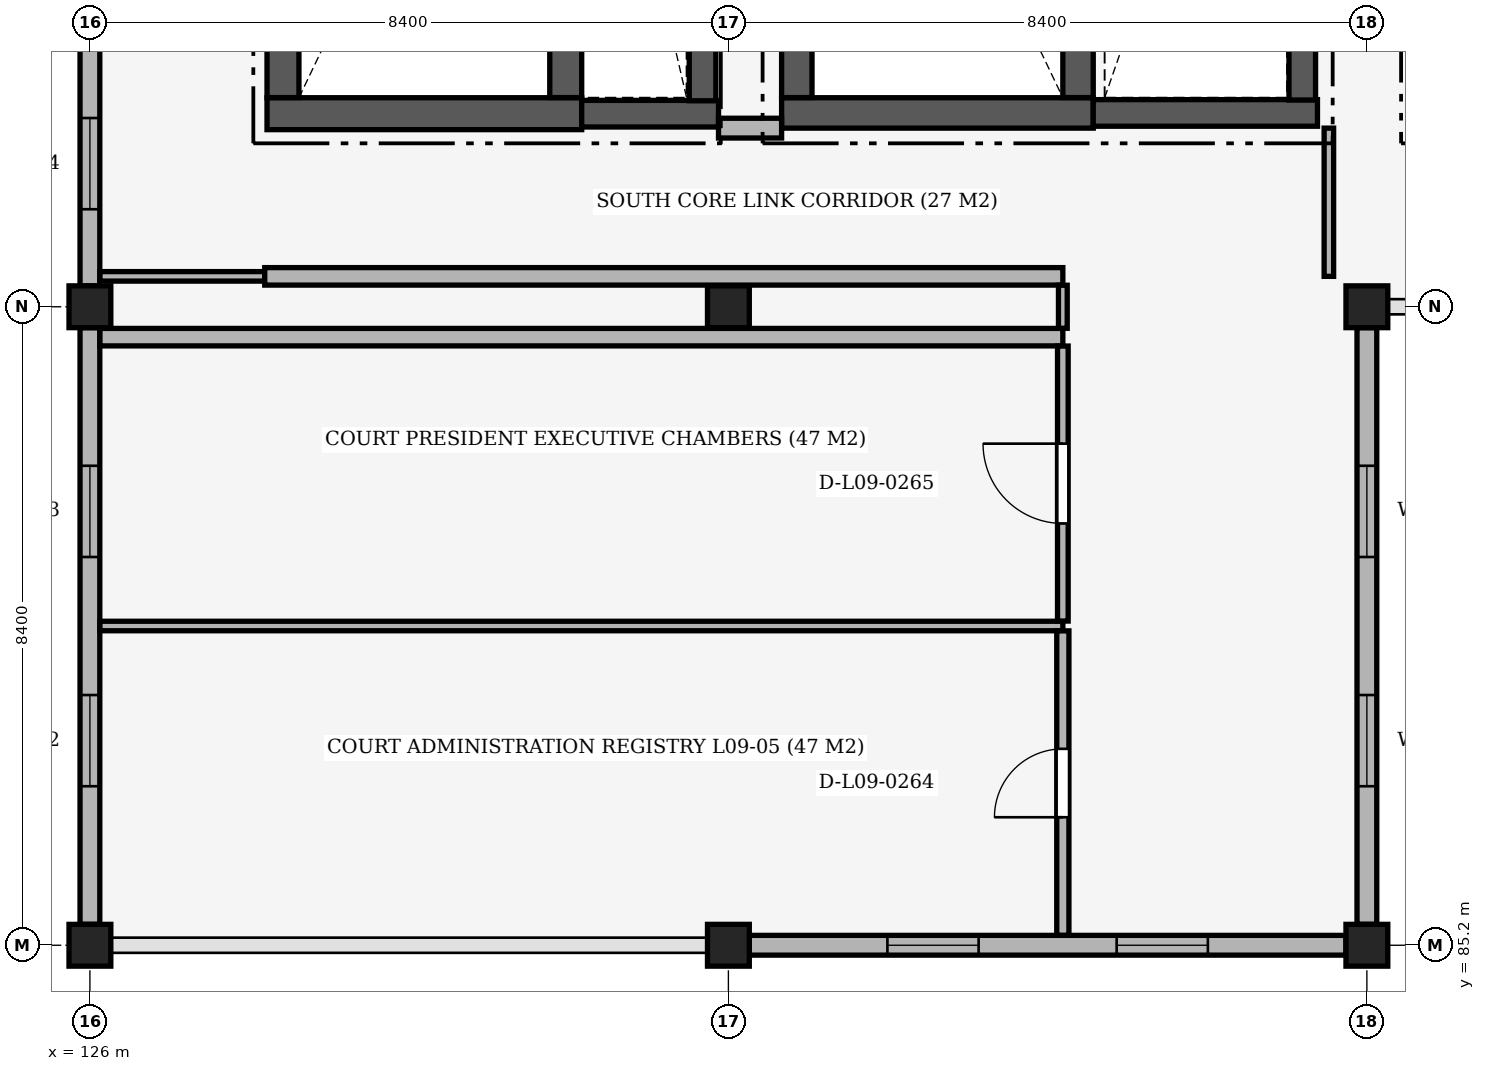
"""IFC4 building model, lengths in metres.
Left out: names, types, materials, properties, quantities, classifications, styles, units other than length and angle.
Written with IfcOpenShell. Run it as: python <this file> out.ifc"""

import sys

from ifc_helpers import new_model, si_unit, direction, frame, frame_2d, origin, origin_2d, place, context, subcontext, project, spatial, rectangle, extrude, element, fill, save


model = new_model("IFC4")
c1 = context("Model", 3, precision=1e-05, world=origin(), true_north=direction((0.0, 1.0)))
c2 = subcontext(c1, "Body", "Model", "MODEL_VIEW")
j1 = project(units=[si_unit("LENGTHUNIT", "METRE"), si_unit("PLANEANGLEUNIT", "RADIAN")], contexts=[c1])
p1 = place(None, origin())
s1 = spatial("IfcSite", under=j1, at=p1, CompositionType="ELEMENT")
p2 = place(p1, origin())
s2 = spatial("IfcBuilding", under=s1, at=p2, CompositionType="ELEMENT")
p3 = place(p2, frame((0.0, 0.0, 42.0)))
s3 = spatial("IfcBuildingStorey", under=s2, at=p3, CompositionType="ELEMENT", Elevation=42.0)
for number, where, z_axis, x_axis in (
    (1, (126.0, 85.2, 0.0), (0.0, 0.0, 1.0), (1.0, 0.0, 0.0)),
    (2, (126.0, 93.6, 0.0), (0.0, 0.0, 1.0), (1.0, 0.0, 0.0)),
    (3, (134.4, 85.2, 0.0), (0.0, 0.0, 1.0), (1.0, 0.0, 0.0)),
    (4, (134.4, 93.6, 0.0), (0.0, 0.0, 1.0), (1.0, 0.0, 0.0)),
    (5, (142.8, 85.2, 0.0), (0.0, 0.0, 1.0), (1.0, 0.0, 0.0)),
    (6, (142.8, 93.6, 0.0), (0.0, 0.0, 1.0), (1.0, 0.0, 0.0)),
):
    element("IfcColumn", number, at=place(p3, frame(where, z_axis=z_axis, x_axis=x_axis)), inside=s3, PredefinedType="COLUMN", context=c2, shape_type="SweptSolid", body=[
        extrude(rectangle(XDim=0.55, YDim=0.55, at=origin_2d()), origin(), (0.0, 0.0, 1.0), 3.9),
    ])
p4 = place(p3, frame((142.525, 85.2, 0.0), z_axis=(0.0, 0.0, 1.0), x_axis=(-1.0, 0.0, 0.0)))
e7 = element("IfcWall", 7, at=p4, inside=s3, PredefinedType="SOLIDWALL", context=c2, shape_type="SweptSolid", body=[
    extrude(rectangle(XDim=7.85, YDim=0.26, at=frame_2d((3.925, 0.0))), origin(), (0.0, 0.0, 1.0), 2.96),
])
p5 = place(p4, frame((1.817, 0.0, 1.71)))
e8 = element("IfcOpeningElement", 8, at=p5, cuts=e7, PredefinedType="OPENING", context=c2, shape_type="SweptSolid", body=[
    extrude(rectangle(XDim=1.2, YDim=0.9, at=frame_2d((0.6, 0.45))), frame((0.0, 0.145, 0.0), z_axis=(0.0, -1.0, 0.0), x_axis=(1.0, 0.0, 0.0)), (0.0, 0.0, 1.0), 0.29),
])
p6 = place(p4, frame((4.833, 0.0, 1.71)))
e9 = element("IfcOpeningElement", 9, at=p6, cuts=e7, PredefinedType="OPENING", context=c2, shape_type="SweptSolid", body=[
    extrude(rectangle(XDim=1.2, YDim=0.9, at=frame_2d((0.6, 0.45))), frame((0.0, 0.145, 0.0), z_axis=(0.0, -1.0, 0.0), x_axis=(1.0, 0.0, 0.0)), (0.0, 0.0, 1.0), 0.29),
])
p7 = place(p3, frame((126.0, 85.475, 0.0), z_axis=(0.0, 0.0, 1.0), x_axis=(0.0, 1.0, 0.0)))
e10 = element("IfcWall", 10, at=p7, inside=s3, PredefinedType="SOLIDWALL", context=c2, shape_type="SweptSolid", body=[
    extrude(rectangle(XDim=7.85, YDim=0.26, at=frame_2d((3.925, 0.0))), origin(), (0.0, 0.0, 1.0), 2.96),
])
p8 = place(p7, frame((1.817, 0.0, 1.71)))
e11 = element("IfcOpeningElement", 11, at=p8, cuts=e10, PredefinedType="OPENING", context=c2, shape_type="SweptSolid", body=[
    extrude(rectangle(XDim=1.2, YDim=0.9, at=frame_2d((0.6, 0.45))), frame((0.0, 0.145, 0.0), z_axis=(0.0, -1.0, 0.0), x_axis=(1.0, 0.0, 0.0)), (0.0, 0.0, 1.0), 0.29),
])
p9 = place(p7, frame((4.833, 0.0, 1.71)))
e12 = element("IfcOpeningElement", 12, at=p9, cuts=e10, PredefinedType="OPENING", context=c2, shape_type="SweptSolid", body=[
    extrude(rectangle(XDim=1.2, YDim=0.9, at=frame_2d((0.6, 0.45))), frame((0.0, 0.145, 0.0), z_axis=(0.0, -1.0, 0.0), x_axis=(1.0, 0.0, 0.0)), (0.0, 0.0, 1.0), 0.29),
])
p10 = place(p3, frame((126.0, 93.875, 0.0), z_axis=(0.0, 0.0, 1.0), x_axis=(0.0, 1.0, 0.0)))
e13 = element("IfcWall", 13, at=p10, inside=s3, PredefinedType="SOLIDWALL", context=c2, shape_type="SweptSolid", body=[
    extrude(rectangle(XDim=5.425, YDim=0.26, at=frame_2d((2.712, 0.0))), origin(), (0.0, 0.0, 1.0), 3.11),
])
p11 = place(p10, frame((1.008, 0.0, 1.86)))
e14 = element("IfcOpeningElement", 14, at=p11, cuts=e13, PredefinedType="OPENING", context=c2, shape_type="SweptSolid", body=[
    extrude(rectangle(XDim=1.2, YDim=0.9, at=frame_2d((0.6, 0.45))), frame((0.0, 0.145, 0.0), z_axis=(0.0, -1.0, 0.0), x_axis=(1.0, 0.0, 0.0)), (0.0, 0.0, 1.0), 0.29),
])
p12 = place(p10, frame((3.217, 0.0, 1.86)))
e15 = element("IfcOpeningElement", 15, at=p12, cuts=e13, PredefinedType="OPENING", context=c2, shape_type="SweptSolid", body=[
    extrude(rectangle(XDim=1.2, YDim=0.9, at=frame_2d((0.6, 0.45))), frame((0.0, 0.145, 0.0), z_axis=(0.0, -1.0, 0.0), x_axis=(1.0, 0.0, 0.0)), (0.0, 0.0, 1.0), 0.29),
])
p13 = place(p3, frame((142.8, 93.325, 0.0), z_axis=(0.0, 0.0, 1.0), x_axis=(0.0, -1.0, 0.0)))
e16 = element("IfcWall", 16, at=p13, inside=s3, PredefinedType="SOLIDWALL", context=c2, shape_type="SweptSolid", body=[
    extrude(rectangle(XDim=7.85, YDim=0.26, at=frame_2d((3.925, 0.0))), origin(), (0.0, 0.0, 1.0), 2.96),
])
p14 = place(p13, frame((1.817, 0.0, 1.71)))
e17 = element("IfcOpeningElement", 17, at=p14, cuts=e16, PredefinedType="OPENING", context=c2, shape_type="SweptSolid", body=[
    extrude(rectangle(XDim=1.2, YDim=0.9, at=frame_2d((0.6, 0.45))), frame((0.0, 0.145, 0.0), z_axis=(0.0, -1.0, 0.0), x_axis=(1.0, 0.0, 0.0)), (0.0, 0.0, 1.0), 0.29),
])
p15 = place(p13, frame((4.833, 0.0, 1.71)))
e18 = element("IfcOpeningElement", 18, at=p15, cuts=e16, PredefinedType="OPENING", context=c2, shape_type="SweptSolid", body=[
    extrude(rectangle(XDim=1.2, YDim=0.9, at=frame_2d((0.6, 0.45))), frame((0.0, 0.145, 0.0), z_axis=(0.0, -1.0, 0.0), x_axis=(1.0, 0.0, 0.0)), (0.0, 0.0, 1.0), 0.29),
])
p16 = place(p3, frame((128.33, 96.14, 0.0), z_axis=(0.0, 0.0, 1.0), x_axis=(1.0, 0.0, 0.0)))
e19 = element("IfcWall", 19, at=p16, inside=s3, PredefinedType="SHEAR", context=c2, shape_type="SweptSolid", body=[
    extrude(rectangle(XDim=4.14, YDim=0.42, at=frame_2d((2.07, 0.0))), origin(), (0.0, 0.0, 1.0), 3.66),
])
for number, where, z_axis, x_axis in (
    (20, (128.54, 96.352, 0.0), (0.0, 0.0, 1.0), (0.0, 1.0, 0.0)),
    (21, (132.26, 96.352, 0.0), (0.0, 0.0, 1.0), (0.0, 1.0, 0.0)),
):
    element("IfcWall", number, at=place(p3, frame(where, z_axis=z_axis, x_axis=x_axis)), inside=s3, PredefinedType="SHEAR", context=c2, shape_type="SweptSolid", body=[
        extrude(rectangle(XDim=6.896, YDim=0.42, at=frame_2d((3.448, 0.0))), origin(), (0.0, 0.0, 1.0), 3.66),
    ])
p17 = place(p3, frame((132.47, 96.14, 0.0), z_axis=(0.0, 0.0, 1.0), x_axis=(1.0, 0.0, 0.0)))
e22 = element("IfcWall", 22, at=p17, inside=s3, PredefinedType="SHEAR", context=c2, shape_type="SweptSolid", body=[
    extrude(rectangle(XDim=1.8, YDim=0.35, at=frame_2d((0.9, 0.0))), origin(), (0.0, 0.0, 1.0), 3.66),
])
p18 = place(p3, frame((134.06, 96.31, 0.0), z_axis=(0.0, 0.0, 1.0), x_axis=(0.0, 1.0, 0.0)))
e23 = element("IfcWall", 23, at=p18, inside=s3, PredefinedType="SHEAR", context=c2, shape_type="SweptSolid", body=[
    extrude(rectangle(XDim=7.197, YDim=0.35, at=frame_2d((3.599, 0.0))), origin(), (0.0, 0.0, 1.0), 3.66),
])
p19 = place(p3, frame((135.1, 96.15, 0.0), z_axis=(0.0, 0.0, 1.0), x_axis=(1.0, 0.0, 0.0)))
e24 = element("IfcWall", 24, at=p19, inside=s3, PredefinedType="SHEAR", context=c2, shape_type="SweptSolid", body=[
    extrude(rectangle(XDim=4.1, YDim=0.4, at=frame_2d((2.05, 0.0))), origin(), (0.0, 0.0, 1.0), 3.66),
])
for number, where, z_axis, x_axis in (
    (25, (135.3, 96.352, 0.0), (0.0, 0.0, 1.0), (0.0, 1.0, 0.0)),
    (26, (139.0, 96.352, 0.0), (0.0, 0.0, 1.0), (0.0, 1.0, 0.0)),
):
    element("IfcWall", number, at=place(p3, frame(where, z_axis=z_axis, x_axis=x_axis)), inside=s3, PredefinedType="SHEAR", context=c2, shape_type="SweptSolid", body=[
        extrude(rectangle(XDim=6.896, YDim=0.4, at=frame_2d((3.448, 0.0))), origin(), (0.0, 0.0, 1.0), 3.66),
    ])
p20 = place(p3, frame((139.2, 96.15, 0.0), z_axis=(0.0, 0.0, 1.0), x_axis=(1.0, 0.0, 0.0)))
e27 = element("IfcWall", 27, at=p20, inside=s3, PredefinedType="SHEAR", context=c2, shape_type="SweptSolid", body=[
    extrude(rectangle(XDim=2.95, YDim=0.35, at=frame_2d((1.475, 0.0))), origin(), (0.0, 0.0, 1.0), 3.66),
])
p21 = place(p3, frame((141.95, 96.32, 0.0), z_axis=(0.0, 0.0, 1.0), x_axis=(0.0, 1.0, 0.0)))
e28 = element("IfcWall", 28, at=p21, inside=s3, PredefinedType="SHEAR", context=c2, shape_type="SweptSolid", body=[
    extrude(rectangle(XDim=7.187, YDim=0.35, at=frame_2d((3.594, 0.0))), origin(), (0.0, 0.0, 1.0), 3.66),
])
p22 = place(p3, frame((126.132, 89.4, 0.0), z_axis=(0.0, 0.0, 1.0), x_axis=(1.0, 0.0, 0.0)))
e29 = element("IfcWall", 29, at=p22, inside=s3, PredefinedType="PARTITIONING", context=c2, shape_type="SweptSolid", body=[
    extrude(rectangle(XDim=12.668, YDim=0.125, at=frame_2d((6.334, 0.0))), origin(), (0.0, 0.0, 1.0), 2.96),
])
p23 = place(p3, frame((126.132, 93.2, 0.0), z_axis=(0.0, 0.0, 1.0), x_axis=(1.0, 0.0, 0.0)))
e30 = element("IfcWall", 30, at=p23, inside=s3, PredefinedType="SOLIDWALL", context=c2, shape_type="SweptSolid", body=[
    extrude(rectangle(XDim=12.668, YDim=0.23, at=frame_2d((6.334, 0.0))), origin(), (0.0, 0.0, 1.0), 2.96),
])
p24 = place(p3, frame((126.132, 94.0, 0.0), z_axis=(0.0, 0.0, 1.0), x_axis=(1.0, 0.0, 0.0)))
e31 = element("IfcWall", 31, at=p24, inside=s3, PredefinedType="PARTITIONING", context=c2, shape_type="SweptSolid", body=[
    extrude(rectangle(XDim=2.168, YDim=0.125, at=frame_2d((1.084, 0.0))), origin(), (0.0, 0.0, 1.0), 3.11),
])
p25 = place(p3, frame((128.3, 94.0, 0.0), z_axis=(0.0, 0.0, 1.0), x_axis=(1.0, 0.0, 0.0)))
e32 = element("IfcWall", 32, at=p25, inside=s3, PredefinedType="SOLIDWALL", context=c2, shape_type="SweptSolid", body=[
    extrude(rectangle(XDim=10.5, YDim=0.23, at=frame_2d((5.25, 0.0))), origin(), (0.0, 0.0, 1.0), 3.11),
])
p26 = place(p3, frame((134.27, 95.95, 0.0), z_axis=(0.0, 0.0, 1.0), x_axis=(1.0, 0.0, 0.0)))
e33 = element("IfcWall", 33, at=p26, inside=s3, PredefinedType="PARTITIONING", context=c2, shape_type="SweptSolid", body=[
    extrude(rectangle(XDim=0.83, YDim=0.26, at=frame_2d((0.415, 0.0))), origin(), (0.0, 0.0, 1.0), 3.11),
])
p27 = place(p3, frame((138.8, 85.332, 0.0), z_axis=(0.0, 0.0, 1.0), x_axis=(0.0, 1.0, 0.0)))
e34 = element("IfcWall", 34, at=p27, inside=s3, PredefinedType="PARTITIONING", context=c2, shape_type="SweptSolid", body=[
    extrude(rectangle(XDim=4.004, YDim=0.16, at=frame_2d((2.002, 0.0))), origin(), (0.0, 0.0, 1.0), 2.96),
])
p28 = place(p27, frame((1.552, 0.0, 0.0)))
e35 = element("IfcOpeningElement", 35, at=p28, cuts=e34, PredefinedType="OPENING", context=c2, shape_type="SweptSolid", body=[
    extrude(rectangle(XDim=0.9, YDim=2.1, at=frame_2d((0.45, 1.05))), frame((0.0, 0.095, 0.0), z_axis=(0.0, -1.0, 0.0), x_axis=(1.0, 0.0, 0.0)), (0.0, 0.0, 1.0), 0.19),
])
p29 = place(p3, frame((138.8, 89.465, 0.0), z_axis=(0.0, 0.0, 1.0), x_axis=(0.0, 1.0, 0.0)))
e36 = element("IfcWall", 36, at=p29, inside=s3, PredefinedType="PARTITIONING", context=c2, shape_type="SweptSolid", body=[
    extrude(rectangle(XDim=3.618, YDim=0.14, at=frame_2d((1.809, 0.0))), origin(), (0.0, 0.0, 1.0), 3.36),
])
p30 = place(p29, frame((1.284, 0.0, 0.0)))
e37 = element("IfcOpeningElement", 37, at=p30, cuts=e36, PredefinedType="OPENING", context=c2, shape_type="SweptSolid", body=[
    extrude(rectangle(XDim=1.05, YDim=2.1, at=frame_2d((0.525, 1.05))), frame((0.0, 0.085, 0.0), z_axis=(0.0, -1.0, 0.0), x_axis=(1.0, 0.0, 0.0)), (0.0, 0.0, 1.0), 0.17),
])
p31 = place(p3, frame((138.8, 93.317, 0.0), z_axis=(0.0, 0.0, 1.0), x_axis=(0.0, 1.0, 0.0)))
e38 = element("IfcWall", 38, at=p31, inside=s3, PredefinedType="PARTITIONING", context=c2, shape_type="SweptSolid", body=[
    extrude(rectangle(XDim=0.566, YDim=0.115, at=frame_2d((0.283, 0.0))), origin(), (0.0, 0.0, 1.0), 2.96),
])
p32 = place(p3, frame((142.3, 94.0, 0.0), z_axis=(0.0, 0.0, 1.0), x_axis=(0.0, 1.0, 0.0)))
e39 = element("IfcWall", 39, at=p32, inside=s3, PredefinedType="PARTITIONING", context=c2, shape_type="SweptSolid", body=[
    extrude(rectangle(XDim=1.95, YDim=0.125, at=frame_2d((0.975, 0.0))), origin(), (0.0, 0.0, 1.0), 3.66),
])
p33 = place(p5, origin())
e40 = element("IfcWindow", 40, at=p33, inside=s3, PartitioningType="SINGLE_PANEL", PredefinedType="WINDOW", context=c2, shape_type="SweptSolid", body=[
    extrude(rectangle(XDim=1.2, YDim=0.9, at=frame_2d((0.6, 0.45))), frame((0.0, 0.03, 0.0), z_axis=(0.0, -1.0, 0.0), x_axis=(1.0, 0.0, 0.0)), (0.0, 0.0, 1.0), 0.06),
])
fill(e8, e40)
p34 = place(p6, origin())
e41 = element("IfcWindow", 41, at=p34, inside=s3, PartitioningType="SINGLE_PANEL", PredefinedType="WINDOW", context=c2, shape_type="SweptSolid", body=[
    extrude(rectangle(XDim=1.2, YDim=0.9, at=frame_2d((0.6, 0.45))), frame((0.0, 0.03, 0.0), z_axis=(0.0, -1.0, 0.0), x_axis=(1.0, 0.0, 0.0)), (0.0, 0.0, 1.0), 0.06),
])
fill(e9, e41)
p35 = place(p8, origin())
e42 = element("IfcWindow", 42, at=p35, inside=s3, PartitioningType="SINGLE_PANEL", PredefinedType="WINDOW", context=c2, shape_type="SweptSolid", body=[
    extrude(rectangle(XDim=1.2, YDim=0.9, at=frame_2d((0.6, 0.45))), frame((0.0, 0.03, 0.0), z_axis=(0.0, -1.0, 0.0), x_axis=(1.0, 0.0, 0.0)), (0.0, 0.0, 1.0), 0.06),
])
fill(e11, e42)
p36 = place(p9, origin())
e43 = element("IfcWindow", 43, at=p36, inside=s3, PartitioningType="SINGLE_PANEL", PredefinedType="WINDOW", context=c2, shape_type="SweptSolid", body=[
    extrude(rectangle(XDim=1.2, YDim=0.9, at=frame_2d((0.6, 0.45))), frame((0.0, 0.03, 0.0), z_axis=(0.0, -1.0, 0.0), x_axis=(1.0, 0.0, 0.0)), (0.0, 0.0, 1.0), 0.06),
])
fill(e12, e43)
p37 = place(p11, origin())
e44 = element("IfcWindow", 44, at=p37, inside=s3, PartitioningType="SINGLE_PANEL", PredefinedType="WINDOW", context=c2, shape_type="SweptSolid", body=[
    extrude(rectangle(XDim=1.2, YDim=0.9, at=frame_2d((0.6, 0.45))), frame((0.0, 0.03, 0.0), z_axis=(0.0, -1.0, 0.0), x_axis=(1.0, 0.0, 0.0)), (0.0, 0.0, 1.0), 0.06),
])
fill(e14, e44)
p38 = place(p14, origin())
e45 = element("IfcWindow", 45, at=p38, inside=s3, PartitioningType="SINGLE_PANEL", PredefinedType="WINDOW", context=c2, shape_type="SweptSolid", body=[
    extrude(rectangle(XDim=1.2, YDim=0.9, at=frame_2d((0.6, 0.45))), frame((0.0, 0.03, 0.0), z_axis=(0.0, -1.0, 0.0), x_axis=(1.0, 0.0, 0.0)), (0.0, 0.0, 1.0), 0.06),
])
fill(e17, e45)
p39 = place(p15, origin())
e46 = element("IfcWindow", 46, at=p39, inside=s3, PartitioningType="SINGLE_PANEL", PredefinedType="WINDOW", context=c2, shape_type="SweptSolid", body=[
    extrude(rectangle(XDim=1.2, YDim=0.9, at=frame_2d((0.6, 0.45))), frame((0.0, 0.03, 0.0), z_axis=(0.0, -1.0, 0.0), x_axis=(1.0, 0.0, 0.0)), (0.0, 0.0, 1.0), 0.06),
])
fill(e18, e46)
p40 = place(p28, origin())
e47 = element("IfcDoor", 47, at=p40, inside=s3, OperationType="SINGLE_SWING_LEFT", PredefinedType="DOOR", context=c2, shape_type="SweptSolid", body=[
    extrude(rectangle(XDim=0.9, YDim=2.1, at=frame_2d((0.45, 1.05))), frame((0.0, 0.025, 0.0), z_axis=(0.0, -1.0, 0.0), x_axis=(1.0, 0.0, 0.0)), (0.0, 0.0, 1.0), 0.05),
])
fill(e35, e47)
p41 = place(p30, origin())
e48 = element("IfcDoor", 48, at=p41, inside=s3, OperationType="SINGLE_SWING_RIGHT", PredefinedType="DOOR", context=c2, shape_type="SweptSolid", body=[
    extrude(rectangle(XDim=1.05, YDim=2.1, at=frame_2d((0.525, 1.05))), frame((0.0, 0.025, 0.0), z_axis=(0.0, -1.0, 0.0), x_axis=(1.0, 0.0, 0.0)), (0.0, 0.0, 1.0), 0.05),
])
fill(e37, e48)
save(model, sys.argv[1])
